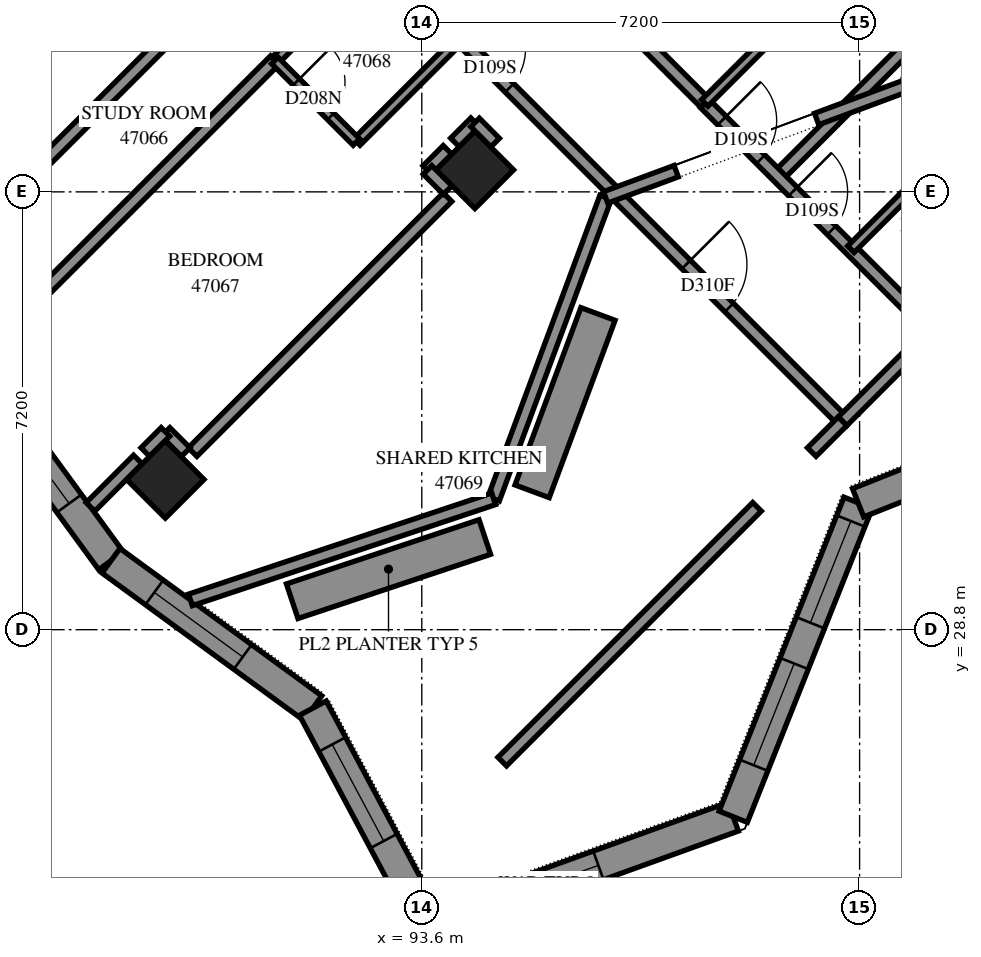
"""IFC4 building model, lengths in metres.
Left out: names, types, materials, properties, quantities, classifications, styles, units other than length and angle.
Written with IfcOpenShell. Run it as: python <this file> out.ifc"""

import sys

from ifc_helpers import new_model, si_unit, direction, frame, frame_2d, origin, origin_2d, place, context, subcontext, project, spatial, polyline, rectangle, outline, extrude, element, fill, save


model = new_model("IFC4")
c1 = context("Model", 3, precision=1e-05, world=origin(), true_north=direction((0.0, 1.0)))
c2 = subcontext(c1, "Body", "Model", "MODEL_VIEW")
j1 = project(units=[si_unit("LENGTHUNIT", "METRE"), si_unit("PLANEANGLEUNIT", "RADIAN")], contexts=[c1])
p1 = place(None, origin())
s1 = spatial("IfcSite", under=j1, at=p1, CompositionType="ELEMENT")
p2 = place(p1, origin())
s2 = spatial("IfcBuilding", under=s1, at=p2, CompositionType="ELEMENT")
p3 = place(p2, frame((0.0, 0.0, 172.8)))
s3 = spatial("IfcBuildingStorey", under=s2, at=p3, CompositionType="ELEMENT", Elevation=172.8)
for number, where, z_axis, x_axis in (
    (1, (94.474, 36.362, 0.0), (0.0, 0.0, 1.0), (0.707, -0.707, 0.0)),
    (2, (89.382, 31.271, 0.0), (0.0, 0.0, 1.0), (0.707, -0.707, 0.0)),
):
    element("IfcColumn", number, at=place(p3, frame(where, z_axis=z_axis, x_axis=x_axis)), inside=s3, PredefinedType="COLUMN", context=c2, shape_type="SweptSolid", body=[
        extrude(rectangle(XDim=0.9, YDim=0.9, at=origin_2d()), origin(), (0.0, 0.0, 1.0), 3.1),
    ])
p4 = place(p3, frame((93.722, 23.921, 0.0), z_axis=(0.0, 0.0, 1.0), x_axis=(0.9406900757, 0.339267124, 0.0)))
e3 = element("IfcWall", 3, at=p4, inside=s3, PredefinedType="SOLIDWALL", context=c2, shape_type="SweptSolid", body=[
    extrude(outline(polyline([(-0.216, -0.25), (5.427, -0.25), (5.202, 0.25), (0.216, 0.25), (-0.216, -0.25)])), origin(), (0.0, 0.0, 1.0), 3.1),
])
p5 = place(p4, frame((1.157, 0.0, 0.7)))
e4 = element("IfcOpeningElement", 4, at=p5, cuts=e3, PredefinedType="OPENING", context=c2, shape_type="SweptSolid", body=[
    extrude(rectangle(XDim=1.8, YDim=2.1, at=frame_2d((0.9, 1.05))), frame((0.0, 0.26, 0.0), z_axis=(0.0, -1.0, 0.0), x_axis=(1.0, 0.0, 0.0)), (0.0, 0.0, 1.0), 0.52),
])
p6 = place(p3, frame((98.722, 25.724, 0.0), z_axis=(0.0, 0.0, 1.0), x_axis=(0.3696926776, 0.9291540906, 0.0)))
e5 = element("IfcWall", 5, at=p6, inside=s3, PredefinedType="SOLIDWALL", context=c2, shape_type="SweptSolid", body=[
    extrude(outline(polyline([(-0.113, -0.25), (5.449, -0.25), (5.664, 0.25), (0.113, 0.25), (-0.113, -0.25)])), origin(), (0.0, 0.0, 1.0), 3.1),
])
p7 = place(p6, frame((0.911, 0.0, 0.7)))
e6 = element("IfcOpeningElement", 6, at=p7, cuts=e5, PredefinedType="OPENING", context=c2, shape_type="SweptSolid", body=[
    extrude(rectangle(XDim=1.8, YDim=2.1, at=frame_2d((0.9, 1.05))), frame((0.0, 0.26, 0.0), z_axis=(0.0, -1.0, 0.0), x_axis=(1.0, 0.0, 0.0)), (0.0, 0.0, 1.0), 0.52),
])
p8 = place(p6, frame((3.433, 0.0, 0.7)))
e7 = element("IfcOpeningElement", 7, at=p8, cuts=e5, PredefinedType="OPENING", context=c2, shape_type="SweptSolid", body=[
    extrude(rectangle(XDim=1.8, YDim=2.1, at=frame_2d((0.9, 1.05))), frame((0.0, 0.26, 0.0), z_axis=(0.0, -1.0, 0.0), x_axis=(1.0, 0.0, 0.0)), (0.0, 0.0, 1.0), 0.52),
])
p9 = place(p3, frame((100.776, 30.887, 0.0), z_axis=(0.0, 0.0, 1.0), x_axis=(0.9291503682, 0.3697020331, 0.0)))
e8 = element("IfcWall", 8, at=p9, inside=s3, PredefinedType="SOLIDWALL", context=c2, shape_type="SweptSolid", body=[
    extrude(outline(polyline([(0.108, -0.25), (5.669, -0.25), (5.444, 0.25), (-0.108, 0.25), (0.108, -0.25)])), origin(), (0.0, 0.0, 1.0), 3.1),
])
p10 = place(p9, frame((1.15, 0.0, 0.7)))
e9 = element("IfcOpeningElement", 9, at=p10, cuts=e8, PredefinedType="OPENING", context=c2, shape_type="SweptSolid", body=[
    extrude(rectangle(XDim=1.8, YDim=2.1, at=frame_2d((0.9, 1.05))), frame((0.0, 0.26, 0.0), z_axis=(0.0, -1.0, 0.0), x_axis=(1.0, 0.0, 0.0)), (0.0, 0.0, 1.0), 0.52),
])
p11 = place(p3, frame((86.075, 33.239, 0.0), z_axis=(0.0, 0.0, 1.0), x_axis=(0.5898094806, -0.8075424302, 0.0)))
e10 = element("IfcWall", 10, at=p11, inside=s3, PredefinedType="SOLIDWALL", context=c2, shape_type="SweptSolid", body=[
    extrude(outline(polyline([(0.039, -0.25), (4.131, -0.25), (4.053, 0.25), (-0.039, 0.25), (0.039, -0.25)])), origin(), (0.0, 0.0, 1.0), 3.1),
])
p12 = place(p11, frame((1.127, 0.0, 0.7)))
e11 = element("IfcOpeningElement", 11, at=p12, cuts=e10, PredefinedType="OPENING", context=c2, shape_type="SweptSolid", body=[
    extrude(rectangle(XDim=1.8, YDim=2.1, at=frame_2d((0.9, 1.05))), frame((0.0, 0.26, 0.0), z_axis=(0.0, -1.0, 0.0), x_axis=(1.0, 0.0, 0.0)), (0.0, 0.0, 1.0), 0.52),
])
p13 = place(p3, frame((88.489, 29.934, 0.0), z_axis=(0.0, 0.0, 1.0), x_axis=(0.8075466626, -0.5898036858, 0.0)))
e12 = element("IfcWall", 12, at=p13, inside=s3, PredefinedType="SOLIDWALL", context=c2, shape_type="SweptSolid", body=[
    extrude(outline(polyline([(-0.039, -0.25), (4.053, -0.25), (4.168, 0.25), (0.039, 0.25), (-0.039, -0.25)])), origin(), (0.0, 0.0, 1.0), 3.1),
])
p14 = place(p13, frame((0.883, 0.0, 0.7)))
e13 = element("IfcOpeningElement", 13, at=p14, cuts=e12, PredefinedType="OPENING", context=c2, shape_type="SweptSolid", body=[
    extrude(rectangle(XDim=1.8, YDim=2.1, at=frame_2d((0.9, 1.05))), frame((0.0, 0.26, 0.0), z_axis=(0.0, -1.0, 0.0), x_axis=(1.0, 0.0, 0.0)), (0.0, 0.0, 1.0), 0.52),
])
p15 = place(p3, frame((91.808, 27.51, 0.0), z_axis=(0.0, 0.0, 1.0), x_axis=(0.4707005336, -0.8822930395, 0.0)))
e14 = element("IfcWall", 14, at=p15, inside=s3, PredefinedType="SOLIDWALL", context=c2, shape_type="SweptSolid", body=[
    extrude(outline(polyline([(0.057, -0.25), (4.284, -0.25), (3.851, 0.25), (-0.057, 0.25), (0.057, -0.25)])), origin(), (0.0, 0.0, 1.0), 3.1),
])
p16 = place(p15, frame((0.677, 0.0, 0.7)))
e15 = element("IfcOpeningElement", 15, at=p16, cuts=e14, PredefinedType="OPENING", context=c2, shape_type="SweptSolid", body=[
    extrude(rectangle(XDim=1.8, YDim=2.1, at=frame_2d((0.9, 1.05))), frame((0.0, 0.26, 0.0), z_axis=(0.0, -1.0, 0.0), x_axis=(1.0, 0.0, 0.0)), (0.0, 0.0, 1.0), 0.52),
])
p17 = place(p3, frame((96.623, 35.909, 0.0), z_axis=(0.0, 0.0, 1.0), x_axis=(-0.3481832062, -0.9374265064, 0.0)))
e16 = element("IfcWall", 16, at=p17, inside=s3, PredefinedType="PARAPET", context=c2, shape_type="SweptSolid", body=[
    extrude(outline(polyline([(-0.046, -0.1), (5.24, -0.1), (5.336, 0.1), (0.046, 0.1), (-0.046, -0.1)])), origin(), (0.0, 0.0, 1.0), 0.25),
])
p18 = place(p3, frame((94.782, 30.952, 0.0), z_axis=(0.0, 0.0, 1.0), x_axis=(-0.9486813956, -0.3162334732, 0.0)))
e17 = element("IfcWall", 17, at=p18, inside=s3, PredefinedType="PARAPET", context=c2, shape_type="SweptSolid", body=[
    extrude(outline(polyline([(0.048, -0.1), (5.257, -0.1), (5.257, 0.1), (-0.048, 0.1), (0.048, -0.1)])), origin(), (0.0, 0.0, 1.0), 0.25),
])
p19 = place(p3, frame((96.498, 33.992, 0.0), z_axis=(0.0, 0.0, 1.0), x_axis=(-0.3481905653, -0.937423773, 0.0)))
e18 = element("IfcWall", 18, at=p19, inside=s3, PredefinedType="SOLIDWALL", context=c2, shape_type="SweptSolid", body=[
    extrude(rectangle(XDim=3.111, YDim=0.6, at=frame_2d((1.555, 0.0))), origin(), (0.0, 0.0, 1.0), 0.65),
])
p20 = place(p3, frame((91.967, 40.785, 0.0), z_axis=(0.0, 0.0, 1.0), x_axis=(0.7071067812, -0.7071067812, 0.0)))
e19 = element("IfcWall", 19, at=p20, inside=s3, PredefinedType="PARTITIONING", context=c2, shape_type="SweptSolid", body=[
    extrude(rectangle(XDim=12.1, YDim=0.2, at=frame_2d((6.05, 0.0))), origin(), (0.0, 0.0, 1.0), 3.1),
])
p21 = place(p20, frame((3.448, 0.0, 0.0)))
e20 = element("IfcOpeningElement", 20, at=p21, cuts=e19, PredefinedType="OPENING", context=c2, shape_type="SweptSolid", body=[
    extrude(rectangle(XDim=0.9, YDim=2.1, at=frame_2d((0.45, 1.05))), frame((0.0, 0.11, 0.0), z_axis=(0.0, -1.0, 0.0), x_axis=(1.0, 0.0, 0.0)), (0.0, 0.0, 1.0), 0.22),
])
p22 = place(p20, frame((8.457, 0.0, 0.0)))
e21 = element("IfcOpeningElement", 21, at=p22, cuts=e19, PredefinedType="OPENING", context=c2, shape_type="SweptSolid", body=[
    extrude(rectangle(XDim=1.0, YDim=2.1, at=frame_2d((0.5, 1.05))), frame((0.0, 0.11, 0.0), z_axis=(0.0, -1.0, 0.0), x_axis=(1.0, 0.0, 0.0)), (0.0, 0.0, 1.0), 0.22),
])
p23 = place(p3, frame((86.834, 35.94, 0.0), z_axis=(0.0, 0.0, 1.0), x_axis=(0.7072486139, 0.7069649201, 0.0)))
e22 = element("IfcWall", 22, at=p23, inside=s3, PredefinedType="PARTITIONING", context=c2, shape_type="SweptSolid", body=[
    extrude(rectangle(XDim=7.05, YDim=0.2, at=frame_2d((3.525, 0.0))), origin(), (0.0, 0.0, 1.0), 3.1),
])
p24 = place(p23, frame((5.848, 0.0, 0.0)))
e23 = element("IfcOpeningElement", 23, at=p24, cuts=e22, PredefinedType="OPENING", context=c2, shape_type="SweptSolid", body=[
    extrude(rectangle(XDim=1.0, YDim=2.1, at=frame_2d((0.5, 1.05))), frame((0.0, 0.11, 0.0), z_axis=(0.0, -1.0, 0.0), x_axis=(1.0, 0.0, 0.0)), (0.0, 0.0, 1.0), 0.22),
])
p25 = place(p3, frame((86.33, 33.314, 0.0), z_axis=(0.0, 0.0, 1.0), x_axis=(0.7072524653, 0.7069610671, 0.0)))
e24 = element("IfcWall", 24, at=p25, inside=s3, PredefinedType="PARTITIONING", context=c2, shape_type="SweptSolid", body=[
    extrude(rectangle(XDim=6.864, YDim=0.2, at=frame_2d((3.432, 0.0))), origin(), (0.0, 0.0, 1.0), 3.1),
])
p26 = place(p3, frame((99.458, 36.256, 0.0), z_axis=(0.0, 0.0, 1.0), x_axis=(0.7071067812, 0.7071067812, 0.0)))
e25 = element("IfcWall", 25, at=p26, inside=s3, PredefinedType="PARTITIONING", context=c2, shape_type="SweptSolid", body=[
    extrude(rectangle(XDim=6.85, YDim=0.2, at=frame_2d((3.425, 0.0))), origin(), (0.0, 0.0, 1.0), 3.1),
])
p27 = place(p3, frame((89.831, 31.721, 0.0), z_axis=(0.0, 0.0, 1.0), x_axis=(0.7071067812, 0.7071067812, 0.0)))
e26 = element("IfcWall", 26, at=p27, inside=s3, PredefinedType="PARTITIONING", context=c2, shape_type="SweptSolid", body=[
    extrude(rectangle(XDim=5.928, YDim=0.2, at=frame_2d((2.964, 0.0))), origin(), (0.0, 0.0, 1.0), 2.6),
])
p28 = place(p3, frame((94.923, 26.631, 0.0), z_axis=(0.0, 0.0, 1.0), x_axis=(0.7071067812, 0.7071067812, 0.0)))
e27 = element("IfcWall", 27, at=p28, inside=s3, PredefinedType="PARTITIONING", context=c2, shape_type="SweptSolid", body=[
    extrude(rectangle(XDim=5.926, YDim=0.2, at=frame_2d((2.963, 0.0))), origin(), (0.0, 0.0, 1.0), 3.1),
])
p29 = place(p3, frame((98.253, 37.455, 0.0), z_axis=(0.0, 0.0, 1.0), x_axis=(0.7071067812, -0.7071067812, 0.0)))
e28 = element("IfcWall", 28, at=p29, inside=s3, PredefinedType="PARTITIONING", context=c2, shape_type="SweptSolid", body=[
    extrude(rectangle(XDim=5.301, YDim=0.2, at=frame_2d((2.65, 0.0))), origin(), (0.0, 0.0, 1.0), 3.1),
])
p30 = place(p29, frame((0.401, 0.0, 0.0)))
e29 = element("IfcOpeningElement", 29, at=p30, cuts=e28, PredefinedType="OPENING", context=c2, shape_type="SweptSolid", body=[
    extrude(rectangle(XDim=0.9, YDim=2.1, at=frame_2d((0.45, 1.05))), frame((0.0, 0.11, 0.0), z_axis=(0.0, -1.0, 0.0), x_axis=(1.0, 0.0, 0.0)), (0.0, 0.0, 1.0), 0.22),
])
p31 = place(p29, frame((2.05, 0.0, 0.0)))
e30 = element("IfcOpeningElement", 30, at=p31, cuts=e28, PredefinedType="OPENING", context=c2, shape_type="SweptSolid", body=[
    extrude(rectangle(XDim=0.9, YDim=2.1, at=frame_2d((0.45, 1.05))), frame((0.0, 0.11, 0.0), z_axis=(0.0, -1.0, 0.0), x_axis=(1.0, 0.0, 0.0)), (0.0, 0.0, 1.0), 0.22),
])
p32 = place(p3, frame((95.573, 40.148, 0.0), z_axis=(0.0, 0.0, 1.0), x_axis=(0.7068698107, -0.7073436723, 0.0)))
e31 = element("IfcWall", 31, at=p32, inside=s3, PredefinedType="PARTITIONING", context=c2, shape_type="SweptSolid", body=[
    extrude(rectangle(XDim=3.799, YDim=0.2, at=frame_2d((1.899, 0.0))), origin(), (0.0, 0.0, 1.0), 3.1),
])
for number, where, z_axis, x_axis in (
    (32, (98.253, 37.461, 0.0), (0.0, 0.0, 1.0), (0.708, 0.707, 0.0)),
    (33, (100.657, 35.057, 0.0), (0.0, 0.0, 1.0), (0.708, 0.707, 0.0)),
    (34, (91.189, 38.161, 0.0), (0.0, 0.0, 1.0), (0.707, 0.708, 0.0)),
    (35, (92.531, 36.819, 0.0), (0.0, 0.0, 1.0), (0.708, 0.707, 0.0)),
):
    element("IfcWall", number, at=place(p3, frame(where, z_axis=z_axis, x_axis=x_axis)), inside=s3, PredefinedType="PARTITIONING", context=c2, shape_type="SweptSolid", body=[
        extrude(rectangle(XDim=2.4, YDim=0.15, at=frame_2d((1.2, 0.0))), origin(), (0.0, 0.0, 1.0), 3.1),
    ])
p33 = place(p3, frame((100.519, 32.227, 0.0), z_axis=(0.0, 0.0, 1.0), x_axis=(0.7071067812, 0.7071067812, 0.0)))
e36 = element("IfcWall", 36, at=p33, inside=s3, PredefinedType="PARTITIONING", context=c2, shape_type="SweptSolid", body=[
    extrude(rectangle(XDim=2.099, YDim=0.2, at=frame_2d((1.049, 0.0))), origin(), (0.0, 0.0, 1.0), 3.1),
])
p34 = place(p3, frame((91.183, 38.161, 0.0), z_axis=(0.0, 0.0, 1.0), x_axis=(0.7071067812, -0.7071067812, 0.0)))
e37 = element("IfcWall", 37, at=p34, inside=s3, PredefinedType="PARTITIONING", context=c2, shape_type="SweptSolid", body=[
    extrude(rectangle(XDim=1.898, YDim=0.15, at=frame_2d((0.949, 0.0))), origin(), (0.0, 0.0, 1.0), 3.1),
])
p35 = place(p34, frame((0.501, 0.0, 0.0)))
e38 = element("IfcOpeningElement", 38, at=p35, cuts=e37, PredefinedType="OPENING", context=c2, shape_type="SweptSolid", body=[
    extrude(rectangle(XDim=0.8, YDim=2.1, at=frame_2d((0.4, 1.05))), frame((0.0, 0.085, 0.0), z_axis=(0.0, -1.0, 0.0), x_axis=(1.0, 0.0, 0.0)), (0.0, 0.0, 1.0), 0.17),
])
p36 = place(p3, frame((88.152, 30.819, 0.0), z_axis=(0.0, 0.0, 1.0), x_axis=(0.7070614204, 0.7071521391, 0.0)))
e39 = element("IfcWall", 39, at=p36, inside=s3, PredefinedType="PARTITIONING", context=c2, shape_type="SweptSolid", body=[
    extrude(rectangle(XDim=1.102, YDim=0.2, at=frame_2d((0.551, 0.0))), origin(), (0.0, 0.0, 1.0), 3.1),
])
p37 = place(p3, frame((100.013, 31.721, 0.0), z_axis=(0.0, 0.0, 1.0), x_axis=(0.7071067812, 0.7071067812, 0.0)))
e40 = element("IfcWall", 40, at=p37, inside=s3, PredefinedType="PARTITIONING", context=c2, shape_type="SweptSolid", body=[
    extrude(rectangle(XDim=0.716, YDim=0.2, at=frame_2d((0.358, 0.0))), origin(), (0.0, 0.0, 1.0), 3.1),
])
for number, where, z_axis, x_axis in (
    (41, (94.145, 36.813, 0.0), (0.0, 0.0, 1.0), (0.707, 0.707, 0.0)),
    (42, (89.386, 32.052, 0.0), (0.0, 0.0, 1.0), (0.707, -0.707, 0.0)),
    (43, (89.053, 31.721, 0.0), (0.0, 0.0, 1.0), (0.707, 0.707, 0.0)),
    (44, (93.691, 36.359, 0.0), (0.0, 0.0, 1.0), (0.707, 0.707, 0.0)),
):
    element("IfcWall", number, at=place(p3, frame(where, z_axis=z_axis, x_axis=x_axis)), inside=s3, PredefinedType="PARTITIONING", context=c2, shape_type="SweptSolid", body=[
        extrude(rectangle(XDim=0.469, YDim=0.2, at=frame_2d((0.235, 0.0))), origin(), (0.0, 0.0, 1.0), 3.1),
    ])
for number, where, z_axis, x_axis in (
    (45, (94.476, 37.142, 0.0), (0.0, 0.0, 1.0), (0.705, -0.709, 0.0)),
    (46, (93.695, 36.361, 0.0), (0.0, 0.0, 1.0), (0.709, -0.705, 0.0)),
):
    element("IfcWall", number, at=place(p3, frame(where, z_axis=z_axis, x_axis=x_axis)), inside=s3, PredefinedType="PARTITIONING", context=c2, shape_type="SweptSolid", body=[
        extrude(rectangle(XDim=0.468, YDim=0.2, at=frame_2d((0.234, 0.0))), origin(), (0.0, 0.0, 1.0), 3.1),
    ])
p38 = place(p3, frame((101.581, 37.751, 0.0), z_axis=(0.0, 0.0, 1.0), x_axis=(-0.9374282115, -0.3481786155, 0.0)))
e47 = element("IfcWall", 47, at=p38, inside=s3, PredefinedType="PARAPET", context=c2, shape_type="SweptSolid", body=[
    extrude(outline(polyline([(0.048, -0.1), (1.586, -0.1), (1.586, 0.1), (-0.048, 0.1), (0.048, -0.1)])), origin(), (0.0, 0.0, 1.0), 0.25),
])
p39 = place(p3, frame((97.784, 36.34, 0.0), z_axis=(0.0, 0.0, 1.0), x_axis=(-0.9374199992, -0.3482007252, 0.0)))
e48 = element("IfcWall", 48, at=p39, inside=s3, PredefinedType="PARAPET", context=c2, shape_type="SweptSolid", body=[
    extrude(outline(polyline([(0.0, -0.1), (1.284, -0.1), (1.192, 0.1), (0.0, 0.1), (0.0, -0.1)])), origin(), (0.0, 0.0, 1.0), 0.25),
])
p40 = place(p3, frame((94.636, 30.324, 0.0), z_axis=(0.0, 0.0, 1.0), x_axis=(-0.9486862934, -0.31621878, 0.0)))
e49 = element("IfcWall", 49, at=p40, inside=s3, PredefinedType="SOLIDWALL", context=c2, shape_type="SweptSolid", body=[
    extrude(outline(polyline([(0.0, -0.3), (3.338, -0.3), (3.338, 0.3), (0.0, 0.3), (0.0, -0.3)])), origin(), (0.0, 0.0, 1.0), 0.65),
])
p41 = place(p5, origin())
e50 = element("IfcWindow", 50, at=p41, inside=s3, PartitioningType="SINGLE_PANEL", PredefinedType="WINDOW", context=c2, shape_type="SweptSolid", body=[
    extrude(rectangle(XDim=1.8, YDim=2.1, at=frame_2d((0.9, 1.05))), frame((0.0, 0.18, 0.0), z_axis=(0.0, -1.0, 0.0), x_axis=(1.0, 0.0, 0.0)), (0.0, 0.0, 1.0), 0.06),
])
fill(e4, e50)
p42 = place(p7, origin())
e51 = element("IfcWindow", 51, at=p42, inside=s3, PartitioningType="SINGLE_PANEL", PredefinedType="WINDOW", context=c2, shape_type="SweptSolid", body=[
    extrude(rectangle(XDim=1.8, YDim=2.1, at=frame_2d((0.9, 1.05))), frame((0.0, 0.18, 0.0), z_axis=(0.0, -1.0, 0.0), x_axis=(1.0, 0.0, 0.0)), (0.0, 0.0, 1.0), 0.06),
])
fill(e6, e51)
p43 = place(p8, origin())
e52 = element("IfcWindow", 52, at=p43, inside=s3, PartitioningType="SINGLE_PANEL", PredefinedType="WINDOW", context=c2, shape_type="SweptSolid", body=[
    extrude(rectangle(XDim=1.8, YDim=2.1, at=frame_2d((0.9, 1.05))), frame((0.0, 0.18, 0.0), z_axis=(0.0, -1.0, 0.0), x_axis=(1.0, 0.0, 0.0)), (0.0, 0.0, 1.0), 0.06),
])
fill(e7, e52)
p44 = place(p12, origin())
e53 = element("IfcWindow", 53, at=p44, inside=s3, PartitioningType="SINGLE_PANEL", PredefinedType="WINDOW", context=c2, shape_type="SweptSolid", body=[
    extrude(rectangle(XDim=1.8, YDim=2.1, at=frame_2d((0.9, 1.05))), frame((0.0, 0.18, 0.0), z_axis=(0.0, -1.0, 0.0), x_axis=(1.0, 0.0, 0.0)), (0.0, 0.0, 1.0), 0.06),
])
fill(e11, e53)
p45 = place(p14, origin())
e54 = element("IfcWindow", 54, at=p45, inside=s3, PartitioningType="SINGLE_PANEL", PredefinedType="WINDOW", context=c2, shape_type="SweptSolid", body=[
    extrude(rectangle(XDim=1.8, YDim=2.1, at=frame_2d((0.9, 1.05))), frame((0.0, 0.18, 0.0), z_axis=(0.0, -1.0, 0.0), x_axis=(1.0, 0.0, 0.0)), (0.0, 0.0, 1.0), 0.06),
])
fill(e13, e54)
p46 = place(p16, origin())
e55 = element("IfcWindow", 55, at=p46, inside=s3, PartitioningType="SINGLE_PANEL", PredefinedType="WINDOW", context=c2, shape_type="SweptSolid", body=[
    extrude(rectangle(XDim=1.8, YDim=2.1, at=frame_2d((0.9, 1.05))), frame((0.0, 0.18, 0.0), z_axis=(0.0, -1.0, 0.0), x_axis=(1.0, 0.0, 0.0)), (0.0, 0.0, 1.0), 0.06),
])
fill(e15, e55)
p47 = place(p30, origin())
e56 = element("IfcDoor", 56, at=p47, inside=s3, OperationType="SINGLE_SWING_LEFT", PredefinedType="DOOR", context=c2, shape_type="SweptSolid", body=[
    extrude(rectangle(XDim=0.9, YDim=2.1, at=frame_2d((0.45, 1.05))), frame((0.0, 0.025, 0.0), z_axis=(0.0, -1.0, 0.0), x_axis=(1.0, 0.0, 0.0)), (0.0, 0.0, 1.0), 0.05),
])
fill(e29, e56)
p48 = place(p21, origin())
e57 = element("IfcDoor", 57, at=p48, inside=s3, OperationType="SINGLE_SWING_LEFT", PredefinedType="DOOR", context=c2, shape_type="SweptSolid", body=[
    extrude(rectangle(XDim=0.9, YDim=2.1, at=frame_2d((0.45, 1.05))), frame((0.0, 0.025, 0.0), z_axis=(0.0, -1.0, 0.0), x_axis=(1.0, 0.0, 0.0)), (0.0, 0.0, 1.0), 0.05),
])
fill(e20, e57)
p49 = place(p35, origin())
e58 = element("IfcDoor", 58, at=p49, inside=s3, OperationType="SINGLE_SWING_RIGHT", PredefinedType="DOOR", context=c2, shape_type="SweptSolid", body=[
    extrude(rectangle(XDim=0.8, YDim=2.1, at=frame_2d((0.4, 1.05))), frame((0.0, 0.025, 0.0), z_axis=(0.0, -1.0, 0.0), x_axis=(1.0, 0.0, 0.0)), (0.0, 0.0, 1.0), 0.05),
])
fill(e38, e58)
p50 = place(p22, origin())
e59 = element("IfcDoor", 59, at=p50, inside=s3, OperationType="SINGLE_SWING_RIGHT", PredefinedType="DOOR", context=c2, shape_type="SweptSolid", body=[
    extrude(rectangle(XDim=1.0, YDim=2.1, at=frame_2d((0.5, 1.05))), frame((0.0, 0.025, 0.0), z_axis=(0.0, -1.0, 0.0), x_axis=(1.0, 0.0, 0.0)), (0.0, 0.0, 1.0), 0.05),
])
fill(e21, e59)
p51 = place(p31, origin())
e60 = element("IfcDoor", 60, at=p51, inside=s3, OperationType="SINGLE_SWING_RIGHT", PredefinedType="DOOR", context=c2, shape_type="SweptSolid", body=[
    extrude(rectangle(XDim=0.9, YDim=2.1, at=frame_2d((0.45, 1.05))), frame((0.0, 0.025, 0.0), z_axis=(0.0, -1.0, 0.0), x_axis=(1.0, 0.0, 0.0)), (0.0, 0.0, 1.0), 0.05),
])
fill(e30, e60)
save(model, sys.argv[1])
